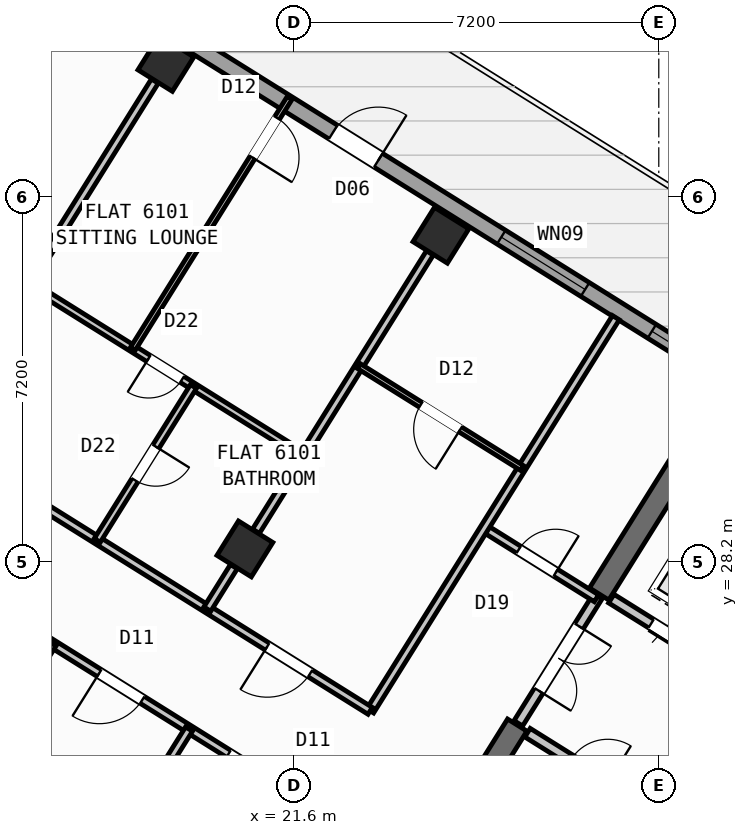
"""IFC4 building model, lengths in metres.
Left out: names, types, materials, properties, quantities, classifications, styles, units other than length and angle.
Written with IfcOpenShell. Run it as: python <this file> out.ifc"""

import sys

from ifc_helpers import new_model, si_unit, direction, frame, frame_2d, origin, origin_2d, place, context, subcontext, project, spatial, rectangle, hollow_rectangle, extrude, source, transform, mapped, element, fill, save


model = new_model("IFC4")
c1 = context("Model", 3, precision=1e-05, world=origin(), true_north=direction((0.0, 1.0)))
c2 = subcontext(c1, "Body", "Model", "MODEL_VIEW")
j1 = project(units=[si_unit("LENGTHUNIT", "METRE"), si_unit("PLANEANGLEUNIT", "RADIAN")], contexts=[c1])
p1 = place(None, origin())
s1 = spatial("IfcSite", under=j1, at=p1, CompositionType="ELEMENT")
p2 = place(p1, origin())
s2 = spatial("IfcBuilding", under=s1, at=p2, CompositionType="ELEMENT")
p3 = place(p2, frame((0.0, 0.0, 242.1)))
s3 = spatial("IfcBuildingStorey", under=s2, at=p3, CompositionType="ELEMENT", Elevation=242.1)
p4 = place(p3, frame((29.544, 30.636, 0.0), z_axis=(0.0, 0.0, 1.0), x_axis=(-0.529902075036, -0.848058836916, 0.0)))
e1 = element("IfcWall", 1, at=p4, inside=s3, PredefinedType="SHEAR", context=c2, shape_type="SweptSolid", body=[
    extrude(rectangle(XDim=3.625, YDim=0.45, at=frame_2d((1.812, 0.0))), origin(), (0.0, 0.0, 1.0), 3.32),
])
p5 = place(p3, frame((26.007, 24.976, 0.0), z_axis=(0.0, 0.0, 1.0), x_axis=(-0.529931155655, -0.848040665456, 0.0)))
e2 = element("IfcWall", 2, at=p5, inside=s3, PredefinedType="SHEAR", context=c2, shape_type="SweptSolid", body=[
    extrude(rectangle(XDim=6.475, YDim=0.45, at=frame_2d((3.238, 0.0))), origin(), (0.0, 0.0, 1.0), 3.32),
])
m1 = source(origin(), c2, "Body", "SweptSolid", [
    extrude(hollow_rectangle(XDim=0.8, YDim=0.8, WallThickness=0.032, at=origin_2d()), origin(), (0.0, 0.0, 1.0), 3.6),
])
for number, where, z_axis, x_axis in (
    (3, (24.5, 34.643, 0.0), (0.0, 0.0, 1.0), (-0.848, 0.53, 0.0)),
    (4, (20.632, 28.452, 0.0), (0.0, 0.0, 1.0), (-0.848, 0.53, 0.0)),
    (5, (19.073, 38.034, 0.0), (0.0, 0.0, 1.0), (-0.848, 0.53, 0.0)),
):
    element("IfcColumn", number, at=place(p3, frame(where, z_axis=z_axis, x_axis=x_axis)), inside=s3, PredefinedType="COLUMN", context=c2, shape_type="MappedRepresentation", body=[
        mapped(m1, transform((0.0, 0.0, 0.0), scale=1.0)),
    ])
p6 = place(p3, frame((14.138, 41.825, 0.0), z_axis=(0.0, 0.0, 1.0), x_axis=(0.848046498049, -0.529921821731, 0.0)))
e6 = element("IfcWall", 6, at=p6, inside=s3, PredefinedType="STANDARD", context=c2, shape_type="SweptSolid", body=[
    extrude(rectangle(XDim=31.588, YDim=0.32, at=frame_2d((15.794, 0.0))), origin(), (0.0, 0.0, 1.0), 3.32),
])
p7 = place(p6, frame((9.712, 0.0, 0.0)))
e7 = element("IfcOpeningElement", 7, at=p7, cuts=e6, PredefinedType="OPENING", context=c2, shape_type="SweptSolid", body=[
    extrude(rectangle(XDim=1.05, YDim=2.15, at=frame_2d((0.525, 1.075))), frame((0.0, 0.17, 0.0), z_axis=(0.0, -1.0, 0.0), x_axis=(1.0, 0.0, 0.0)), (0.0, 0.0, 1.0), 0.34),
])
p8 = place(p6, frame((0.841, 0.0, 0.9)))
e8 = element("IfcOpeningElement", 8, at=p8, cuts=e6, PredefinedType="OPENING", context=c2, shape_type="SweptSolid", body=[
    extrude(rectangle(XDim=1.65, YDim=1.45, at=frame_2d((0.825, 0.725))), frame((0.0, 0.17, 0.0), z_axis=(0.0, -1.0, 0.0), x_axis=(1.0, 0.0, 0.0)), (0.0, 0.0, 1.0), 0.34),
])
p9 = place(p6, frame((4.171, 0.0, 1.0)))
e9 = element("IfcOpeningElement", 9, at=p9, cuts=e6, PredefinedType="OPENING", context=c2, shape_type="SweptSolid", body=[
    extrude(rectangle(XDim=0.9, YDim=1.25, at=frame_2d((0.45, 0.625))), frame((0.0, 0.17, 0.0), z_axis=(0.0, -1.0, 0.0), x_axis=(1.0, 0.0, 0.0)), (0.0, 0.0, 1.0), 0.34),
])
p10 = place(p6, frame((13.624, 0.0, 0.95)))
e10 = element("IfcOpeningElement", 10, at=p10, cuts=e6, PredefinedType="OPENING", context=c2, shape_type="SweptSolid", body=[
    extrude(rectangle(XDim=1.95, YDim=1.35, at=frame_2d((0.975, 0.675))), frame((0.0, 0.17, 0.0), z_axis=(0.0, -1.0, 0.0), x_axis=(1.0, 0.0, 0.0)), (0.0, 0.0, 1.0), 0.34),
])
p11 = place(p6, frame((17.129, 0.0, 1.0)))
e11 = element("IfcOpeningElement", 11, at=p11, cuts=e6, PredefinedType="OPENING", context=c2, shape_type="SweptSolid", body=[
    extrude(rectangle(XDim=0.9, YDim=1.25, at=frame_2d((0.45, 0.625))), frame((0.0, 0.17, 0.0), z_axis=(0.0, -1.0, 0.0), x_axis=(1.0, 0.0, 0.0)), (0.0, 0.0, 1.0), 0.34),
])
p12 = place(p6, frame((21.744, 0.0, 0.9)))
e12 = element("IfcOpeningElement", 12, at=p12, cuts=e6, PredefinedType="OPENING", context=c2, shape_type="SweptSolid", body=[
    extrude(rectangle(XDim=1.65, YDim=1.45, at=frame_2d((0.825, 0.725))), frame((0.0, 0.17, 0.0), z_axis=(0.0, -1.0, 0.0), x_axis=(1.0, 0.0, 0.0)), (0.0, 0.0, 1.0), 0.34),
])
p13 = place(p6, frame((27.394, 0.0, 0.9)))
e13 = element("IfcOpeningElement", 13, at=p13, cuts=e6, PredefinedType="OPENING", context=c2, shape_type="SweptSolid", body=[
    extrude(rectangle(XDim=1.65, YDim=1.45, at=frame_2d((0.825, 0.725))), frame((0.0, 0.17, 0.0), z_axis=(0.0, -1.0, 0.0), x_axis=(1.0, 0.0, 0.0)), (0.0, 0.0, 1.0), 0.34),
])
p14 = place(p3, frame((31.822, 24.998, 0.0), z_axis=(0.0, 0.0, 1.0), x_axis=(-0.848054125777, 0.529909614701, 0.0)))
e14 = element("IfcWall", 14, at=p14, inside=s3, PredefinedType="STANDARD", context=c2, shape_type="SweptSolid", body=[
    extrude(rectangle(XDim=4.668, YDim=0.2, at=frame_2d((2.334, 0.0))), origin(), (0.0, 0.0, 1.0), 3.31),
])
p15 = place(p14, frame((0.52, 0.0, 0.0)))
e15 = element("IfcOpeningElement", 15, at=p15, cuts=e14, PredefinedType="OPENING", context=c2, shape_type="SweptSolid", body=[
    extrude(rectangle(XDim=1.2, YDim=2.15, at=frame_2d((0.6, 1.075))), frame((0.0, 0.11, 0.0), z_axis=(0.0, -1.0, 0.0), x_axis=(1.0, 0.0, 0.0)), (0.0, 0.0, 1.0), 0.22),
])
p16 = place(p14, frame((2.54, 0.0, 0.0)))
e16 = element("IfcOpeningElement", 16, at=p16, cuts=e14, PredefinedType="OPENING", context=c2, shape_type="SweptSolid", body=[
    extrude(rectangle(XDim=1.2, YDim=2.15, at=frame_2d((0.6, 1.075))), frame((0.0, 0.11, 0.0), z_axis=(0.0, -1.0, 0.0), x_axis=(1.0, 0.0, 0.0)), (0.0, 0.0, 1.0), 0.22),
])
p17 = place(p3, frame((31.525, 21.504, 0.0), z_axis=(0.0, 0.0, 1.0), x_axis=(-0.848042066329, 0.529928913853, 0.0)))
e17 = element("IfcWall", 17, at=p17, inside=s3, PredefinedType="STANDARD", context=c2, shape_type="SweptSolid", body=[
    extrude(rectangle(XDim=6.268, YDim=0.2, at=frame_2d((3.134, 0.0))), origin(), (0.0, 0.0, 1.0), 3.31),
])
p18 = place(p17, frame((4.4, 0.0, 0.0)))
e18 = element("IfcOpeningElement", 18, at=p18, cuts=e17, PredefinedType="OPENING", context=c2, shape_type="SweptSolid", body=[
    extrude(rectangle(XDim=0.86, YDim=2.05, at=frame_2d((0.43, 1.025))), frame((0.0, 0.11, 0.0), z_axis=(0.0, -1.0, 0.0), x_axis=(1.0, 0.0, 0.0)), (0.0, 0.0, 1.0), 0.22),
])
p19 = place(p17, frame((0.35, 0.0, 0.0)))
e19 = element("IfcOpeningElement", 19, at=p19, cuts=e17, PredefinedType="OPENING", context=c2, shape_type="SweptSolid", body=[
    extrude(rectangle(XDim=0.86, YDim=2.05, at=frame_2d((0.43, 1.025))), frame((0.0, 0.11, 0.0), z_axis=(0.0, -1.0, 0.0), x_axis=(1.0, 0.0, 0.0)), (0.0, 0.0, 1.0), 0.22),
])
p20 = place(p3, frame((27.596, 27.52, 0.0), z_axis=(0.0, 0.0, 1.0), x_axis=(-0.529865479138, -0.848081702443, 0.0)))
e20 = element("IfcWall", 20, at=p20, inside=s3, PredefinedType="STANDARD", context=c2, shape_type="SweptSolid", body=[
    extrude(rectangle(XDim=2.96, YDim=0.2, at=frame_2d((1.48, 0.0))), origin(), (0.0, 0.0, 1.0), 3.31),
])
p21 = place(p20, frame((0.7, 0.0, 0.0)))
e21 = element("IfcOpeningElement", 21, at=p21, cuts=e20, PredefinedType="OPENING", context=c2, shape_type="SweptSolid", body=[
    extrude(rectangle(XDim=1.5, YDim=2.15, at=frame_2d((0.75, 1.075))), frame((0.0, 0.11, 0.0), z_axis=(0.0, -1.0, 0.0), x_axis=(1.0, 0.0, 0.0)), (0.0, 0.0, 1.0), 0.22),
])
p22 = place(p3, frame((27.57, 27.478, 0.0), z_axis=(0.0, 0.0, 1.0), x_axis=(-0.848050851465, 0.529914854792, 0.0)))
e22 = element("IfcWall", 22, at=p22, inside=s3, PredefinedType="PARTITIONING", context=c2, shape_type="SweptSolid", body=[
    extrude(rectangle(XDim=2.61, YDim=0.16, at=frame_2d((1.305, 0.0))), origin(), (0.0, 0.0, 1.0), 3.31),
])
p23 = place(p22, frame((0.95, 0.0, 0.0)))
e23 = element("IfcOpeningElement", 23, at=p23, cuts=e22, PredefinedType="OPENING", context=c2, shape_type="SweptSolid", body=[
    extrude(rectangle(XDim=0.86, YDim=2.05, at=frame_2d((0.43, 1.025))), frame((0.0, 0.09, 0.0), z_axis=(0.0, -1.0, 0.0), x_axis=(1.0, 0.0, 0.0)), (0.0, 0.0, 1.0), 0.18),
])
p24 = place(p3, frame((27.953, 33.016, 0.0), z_axis=(0.0, 0.0, 1.0), x_axis=(-0.529903001606, -0.848058257957, 0.0)))
e24 = element("IfcWall", 24, at=p24, inside=s3, PredefinedType="PARTITIONING", context=c2, shape_type="SweptSolid", body=[
    extrude(rectangle(XDim=9.15, YDim=0.16, at=frame_2d((4.575, 0.0))), origin(), (0.0, 0.0, 1.0), 3.31),
])
p25 = place(p3, frame((23.104, 25.256, 0.0), z_axis=(0.0, 0.0, 1.0), x_axis=(-0.848041752158, 0.529929416617, 0.0)))
e25 = element("IfcWall", 25, at=p25, inside=s3, PredefinedType="PARTITIONING", context=c2, shape_type="SweptSolid", body=[
    extrude(rectangle(XDim=16.73, YDim=0.16, at=frame_2d((8.365, 0.0))), origin(), (0.0, 0.0, 1.0), 3.31),
])
p26 = place(p25, frame((1.395, 0.0, 0.0)))
e26 = element("IfcOpeningElement", 26, at=p26, cuts=e25, PredefinedType="OPENING", context=c2, shape_type="SweptSolid", body=[
    extrude(rectangle(XDim=1.0, YDim=2.1, at=frame_2d((0.5, 1.05))), frame((0.0, 0.09, 0.0), z_axis=(0.0, -1.0, 0.0), x_axis=(1.0, 0.0, 0.0)), (0.0, 0.0, 1.0), 0.18),
])
p27 = place(p25, frame((7.82, 0.0, 0.0)))
e27 = element("IfcOpeningElement", 27, at=p27, cuts=e25, PredefinedType="OPENING", context=c2, shape_type="SweptSolid", body=[
    extrude(rectangle(XDim=1.0, YDim=2.1, at=frame_2d((0.5, 1.05))), frame((0.0, 0.09, 0.0), z_axis=(0.0, -1.0, 0.0), x_axis=(1.0, 0.0, 0.0)), (0.0, 0.0, 1.0), 0.18),
])
p28 = place(p25, frame((11.14, 0.0, 0.0)))
e28 = element("IfcOpeningElement", 28, at=p28, cuts=e25, PredefinedType="OPENING", context=c2, shape_type="SweptSolid", body=[
    extrude(rectangle(XDim=1.0, YDim=2.1, at=frame_2d((0.5, 1.05))), frame((0.0, 0.09, 0.0), z_axis=(0.0, -1.0, 0.0), x_axis=(1.0, 0.0, 0.0)), (0.0, 0.0, 1.0), 0.18),
])
p29 = place(p3, frame((21.938, 23.391, 0.0), z_axis=(0.0, 0.0, 1.0), x_axis=(-0.848045850158, 0.529922858565, 0.0)))
e29 = element("IfcWall", 29, at=p29, inside=s3, PredefinedType="PARTITIONING", context=c2, shape_type="SweptSolid", body=[
    extrude(rectangle(XDim=16.73, YDim=0.16, at=frame_2d((8.365, 0.0))), origin(), (0.0, 0.0, 1.0), 3.31),
])
p30 = place(p29, frame((0.92, 0.0, 0.0)))
e30 = element("IfcOpeningElement", 30, at=p30, cuts=e29, PredefinedType="OPENING", context=c2, shape_type="SweptSolid", body=[
    extrude(rectangle(XDim=1.0, YDim=2.1, at=frame_2d((0.5, 1.05))), frame((0.0, 0.09, 0.0), z_axis=(0.0, -1.0, 0.0), x_axis=(1.0, 0.0, 0.0)), (0.0, 0.0, 1.0), 0.18),
])
p31 = place(p29, frame((3.928, 0.0, 0.0)))
e31 = element("IfcOpeningElement", 31, at=p31, cuts=e29, PredefinedType="OPENING", context=c2, shape_type="SweptSolid", body=[
    extrude(rectangle(XDim=1.0, YDim=2.1, at=frame_2d((0.5, 1.05))), frame((0.0, 0.09, 0.0), z_axis=(0.0, -1.0, 0.0), x_axis=(1.0, 0.0, 0.0)), (0.0, 0.0, 1.0), 0.18),
])
p32 = place(p29, frame((7.271, 0.0, 0.0)))
e32 = element("IfcOpeningElement", 32, at=p32, cuts=e29, PredefinedType="OPENING", context=c2, shape_type="SweptSolid", body=[
    extrude(rectangle(XDim=1.0, YDim=2.1, at=frame_2d((0.5, 1.05))), frame((0.0, 0.09, 0.0), z_axis=(0.0, -1.0, 0.0), x_axis=(1.0, 0.0, 0.0)), (0.0, 0.0, 1.0), 0.18),
])
p33 = place(p29, frame((10.78, 0.0, 0.0)))
e33 = element("IfcOpeningElement", 33, at=p33, cuts=e29, PredefinedType="OPENING", context=c2, shape_type="SweptSolid", body=[
    extrude(rectangle(XDim=1.0, YDim=2.1, at=frame_2d((0.5, 1.05))), frame((0.0, 0.09, 0.0), z_axis=(0.0, -1.0, 0.0), x_axis=(1.0, 0.0, 0.0)), (0.0, 0.0, 1.0), 0.18),
])
p34 = place(p29, frame((14.372, 0.0, 0.0)))
e34 = element("IfcOpeningElement", 34, at=p34, cuts=e29, PredefinedType="OPENING", context=c2, shape_type="SweptSolid", body=[
    extrude(rectangle(XDim=1.0, YDim=2.1, at=frame_2d((0.5, 1.05))), frame((0.0, 0.09, 0.0), z_axis=(0.0, -1.0, 0.0), x_axis=(1.0, 0.0, 0.0)), (0.0, 0.0, 1.0), 0.18),
])
p35 = place(p3, frame((19.529, 24.896, 0.0), z_axis=(0.0, 0.0, 1.0), x_axis=(-0.529914125013, -0.848051307476, 0.0)))
e35 = element("IfcWall", 35, at=p35, inside=s3, PredefinedType="PARTITIONING", context=c2, shape_type="SweptSolid", body=[
    extrude(rectangle(XDim=10.35, YDim=0.16, at=frame_2d((5.175, 0.0))), origin(), (0.0, 0.0, 1.0), 3.31),
])
p36 = place(p3, frame((16.837, 26.579, 0.0), z_axis=(0.0, 0.0, 1.0), x_axis=(-0.529941690036, -0.848034082547, 0.0)))
e36 = element("IfcWall", 36, at=p36, inside=s3, PredefinedType="PARTITIONING", context=c2, shape_type="SweptSolid", body=[
    extrude(rectangle(XDim=10.35, YDim=0.16, at=frame_2d((5.175, 0.0))), origin(), (0.0, 0.0, 1.0), 2.935),
])
p37 = place(p3, frame((24.282, 34.293, 0.0), z_axis=(0.0, 0.0, 1.0), x_axis=(-0.529934553702, -0.848038542045, 0.0)))
e37 = element("IfcWall", 37, at=p37, inside=s3, PredefinedType="PARTITIONING", context=c2, shape_type="SweptSolid", body=[
    extrude(rectangle(XDim=6.476, YDim=0.16, at=frame_2d((3.238, 0.0))), origin(), (0.0, 0.0, 1.0), 2.845),
])
p38 = place(p3, frame((20.414, 28.103, 0.0), z_axis=(0.0, 0.0, 1.0), x_axis=(-0.529998940003, -0.847998304005, 0.0)))
e38 = element("IfcWall", 38, at=p38, inside=s3, PredefinedType="PARTITIONING", context=c2, shape_type="SweptSolid", body=[
    extrude(rectangle(XDim=0.988, YDim=0.16, at=frame_2d((0.494, 0.0))), origin(), (0.0, 0.0, 1.0), 2.845),
])
p39 = place(p3, frame((26.099, 30.05, 0.0), z_axis=(0.0, 0.0, 1.0), x_axis=(-0.84803087207, 0.529946827537, 0.0)))
e39 = element("IfcWall", 39, at=p39, inside=s3, PredefinedType="PARTITIONING", context=c2, shape_type="SweptSolid", body=[
    extrude(rectangle(XDim=3.79, YDim=0.11, at=frame_2d((1.895, 0.0))), origin(), (0.0, 0.0, 1.0), 3.31),
])
p40 = place(p39, frame((1.435, 0.0, 0.0)))
e40 = element("IfcOpeningElement", 40, at=p40, cuts=e39, PredefinedType="OPENING", context=c2, shape_type="SweptSolid", body=[
    extrude(rectangle(XDim=0.92, YDim=2.08, at=frame_2d((0.46, 1.04))), frame((0.0, 0.065, 0.0), z_axis=(0.0, -1.0, 0.0), x_axis=(1.0, 0.0, 0.0)), (0.0, 0.0, 1.0), 0.13),
])
p41 = place(p3, frame((18.854, 37.685, 0.0), z_axis=(0.0, 0.0, 1.0), x_axis=(-0.529907440938, -0.848055484057, 0.0)))
e41 = element("IfcWall", 41, at=p41, inside=s3, PredefinedType="PARTITIONING", context=c2, shape_type="SweptSolid", body=[
    extrude(rectangle(XDim=6.476, YDim=0.16, at=frame_2d((3.238, 0.0))), origin(), (0.0, 0.0, 1.0), 2.845),
])
p42 = place(p3, frame((21.787, 30.301, 0.0), z_axis=(0.0, 0.0, 1.0), x_axis=(-0.848049732085, 0.529916646191, 0.0)))
e42 = element("IfcWall", 42, at=p42, inside=s3, PredefinedType="PLUMBINGWALL", context=c2, shape_type="SweptSolid", body=[
    extrude(rectangle(XDim=6.4, YDim=0.14, at=frame_2d((3.2, 0.0))), origin(), (0.0, 0.0, 1.0), 3.31),
])
p43 = place(p42, frame((2.824, 0.0, 0.0)))
e43 = element("IfcOpeningElement", 43, at=p43, cuts=e42, PredefinedType="OPENING", context=c2, shape_type="SweptSolid", body=[
    extrude(rectangle(XDim=0.78, YDim=2.05, at=frame_2d((0.39, 1.025))), frame((0.0, 0.08, 0.0), z_axis=(0.0, -1.0, 0.0), x_axis=(1.0, 0.0, 0.0)), (0.0, 0.0, 1.0), 0.16),
])
p44 = place(p3, frame((19.616, 31.657, 0.0), z_axis=(0.0, 0.0, 1.0), x_axis=(-0.529876336437, -0.84807491891, 0.0)))
e44 = element("IfcWall", 44, at=p44, inside=s3, PredefinedType="PLUMBINGWALL", context=c2, shape_type="SweptSolid", body=[
    extrude(rectangle(XDim=3.58, YDim=0.14, at=frame_2d((1.79, 0.0))), origin(), (0.0, 0.0, 1.0), 3.31),
])
p45 = place(p44, frame((1.4, 0.0, 0.0)))
e45 = element("IfcOpeningElement", 45, at=p45, cuts=e44, PredefinedType="OPENING", context=c2, shape_type="SweptSolid", body=[
    extrude(rectangle(XDim=0.78, YDim=2.05, at=frame_2d((0.39, 1.025))), frame((0.0, 0.08, 0.0), z_axis=(0.0, -1.0, 0.0), x_axis=(1.0, 0.0, 0.0)), (0.0, 0.0, 1.0), 0.16),
])
p46 = place(p3, frame((21.517, 37.356, 0.0), z_axis=(0.0, 0.0, 1.0), x_axis=(-0.529916267533, -0.848049968695, 0.0)))
e46 = element("IfcWall", 46, at=p46, inside=s3, PredefinedType="PARTITIONING", context=c2, shape_type="SweptSolid", body=[
    extrude(rectangle(XDim=5.84, YDim=0.11, at=frame_2d((2.92, 0.0))), origin(), (0.0, 0.0, 1.0), 3.31),
])
p47 = place(p46, frame((0.47, 0.0, 0.0)))
e47 = element("IfcOpeningElement", 47, at=p47, cuts=e46, PredefinedType="OPENING", context=c2, shape_type="SweptSolid", body=[
    extrude(rectangle(XDim=0.92, YDim=2.08, at=frame_2d((0.46, 1.04))), frame((0.0, 0.065, 0.0), z_axis=(0.0, -1.0, 0.0), x_axis=(1.0, 0.0, 0.0)), (0.0, 0.0, 1.0), 0.13),
])
p48 = place(p3, frame((16.995, 40.182, 0.0), z_axis=(0.0, 0.0, 1.0), x_axis=(-0.529931378574, -0.848040526156, 0.0)))
e48 = element("IfcWall", 48, at=p48, inside=s3, PredefinedType="PARTITIONING", context=c2, shape_type="SweptSolid", body=[
    extrude(rectangle(XDim=9.42, YDim=0.11, at=frame_2d((4.71, 0.0))), origin(), (0.0, 0.0, 1.0), 3.31),
])
p49 = place(p48, frame((7.78, 0.0, 0.0)))
e49 = element("IfcOpeningElement", 49, at=p49, cuts=e48, PredefinedType="OPENING", context=c2, shape_type="SweptSolid", body=[
    extrude(rectangle(XDim=0.78, YDim=2.05, at=frame_2d((0.39, 1.025))), frame((0.0, 0.065, 0.0), z_axis=(0.0, -1.0, 0.0), x_axis=(1.0, 0.0, 0.0)), (0.0, 0.0, 1.0), 0.13),
])
p50 = place(p48, frame((3.05, 0.0, 0.0)))
e50 = element("IfcOpeningElement", 50, at=p50, cuts=e48, PredefinedType="OPENING", context=c2, shape_type="SweptSolid", body=[
    extrude(rectangle(XDim=0.92, YDim=2.08, at=frame_2d((0.46, 1.04))), frame((0.0, 0.065, 0.0), z_axis=(0.0, -1.0, 0.0), x_axis=(1.0, 0.0, 0.0)), (0.0, 0.0, 1.0), 0.13),
])
m2 = source(origin(), c2, "Body", "SweptSolid", [
    extrude(rectangle(XDim=1.05, YDim=2.15, at=frame_2d((0.525, 1.075))), frame((0.0, 0.025, 0.0), z_axis=(0.0, -1.0, 0.0), x_axis=(1.0, 0.0, 0.0)), (0.0, 0.0, 1.0), 0.05),
])
p51 = place(p7, origin())
e51 = element("IfcDoor", 51, at=p51, inside=s3, OperationType="SINGLE_SWING_RIGHT", PredefinedType="DOOR", context=c2, shape_type="MappedRepresentation", body=[
    mapped(m2, transform((0.0, 0.0, 0.0), scale=1.0)),
])
fill(e7, e51)
m3 = source(origin(), c2, "Body", "SweptSolid", [
    extrude(rectangle(XDim=1.95, YDim=1.35, at=frame_2d((0.975, 0.675))), frame((0.0, 0.03, 0.0), z_axis=(0.0, -1.0, 0.0), x_axis=(1.0, 0.0, 0.0)), (0.0, 0.0, 1.0), 0.06),
])
p52 = place(p10, origin())
e52 = element("IfcWindow", 52, at=p52, inside=s3, PartitioningType="SINGLE_PANEL", PredefinedType="WINDOW", context=c2, shape_type="MappedRepresentation", body=[
    mapped(m3, transform((0.0, 0.0, 0.0), scale=1.0)),
])
fill(e10, e52)
m4 = source(origin(), c2, "Body", "SweptSolid", [
    extrude(rectangle(XDim=0.9, YDim=1.25, at=frame_2d((0.45, 0.625))), frame((0.0, 0.03, 0.0), z_axis=(0.0, -1.0, 0.0), x_axis=(1.0, 0.0, 0.0)), (0.0, 0.0, 1.0), 0.06),
])
p53 = place(p11, origin())
e53 = element("IfcWindow", 53, at=p53, inside=s3, PartitioningType="SINGLE_PANEL", PredefinedType="WINDOW", context=c2, shape_type="MappedRepresentation", body=[
    mapped(m4, transform((0.0, 0.0, 0.0), scale=1.0)),
])
fill(e11, e53)
m5 = source(origin(), c2, "Body", "SweptSolid", [
    extrude(rectangle(XDim=1.2, YDim=2.15, at=frame_2d((0.6, 1.075))), frame((0.0, 0.025, 0.0), z_axis=(0.0, -1.0, 0.0), x_axis=(1.0, 0.0, 0.0)), (0.0, 0.0, 1.0), 0.05),
])
p54 = place(p16, origin())
e54 = element("IfcDoor", 54, at=p54, inside=s3, OperationType="DOUBLE_DOOR_SLIDING", PredefinedType="DOOR", context=c2, shape_type="MappedRepresentation", body=[
    mapped(m5, transform((0.0, 0.0, 0.0), scale=1.0)),
])
fill(e16, e54)
m6 = source(origin(), c2, "Body", "SweptSolid", [
    extrude(rectangle(XDim=0.86, YDim=2.05, at=frame_2d((0.43, 1.025))), frame((0.0, 0.025, 0.0), z_axis=(0.0, -1.0, 0.0), x_axis=(1.0, 0.0, 0.0)), (0.0, 0.0, 1.0), 0.05),
])
p55 = place(p23, frame((0.86, 0.0, 0.0), z_axis=(0.0, 0.0, 1.0), x_axis=(-1.0, 0.0, 0.0)))
e55 = element("IfcDoor", 55, at=p55, inside=s3, OperationType="SINGLE_SWING_RIGHT", PredefinedType="DOOR", context=c2, shape_type="MappedRepresentation", body=[
    mapped(m6, transform((0.0, 0.0, 0.0), scale=1.0)),
])
fill(e23, e55)
m7 = source(origin(), c2, "Body", "SweptSolid", [
    extrude(rectangle(XDim=1.5, YDim=2.15, at=frame_2d((0.75, 1.075))), frame((0.0, 0.025, 0.0), z_axis=(0.0, -1.0, 0.0), x_axis=(1.0, 0.0, 0.0)), (0.0, 0.0, 1.0), 0.05),
])
p56 = place(p21, origin())
e56 = element("IfcDoor", 56, at=p56, inside=s3, OperationType="DOUBLE_DOOR_SINGLE_SWING", PredefinedType="DOOR", context=c2, shape_type="MappedRepresentation", body=[
    mapped(m7, transform((0.0, 0.0, 0.0), scale=1.0)),
])
fill(e21, e56)
m8 = source(origin(), c2, "Body", "SweptSolid", [
    extrude(rectangle(XDim=1.0, YDim=2.1, at=frame_2d((0.5, 1.05))), frame((0.0, 0.025, 0.0), z_axis=(0.0, -1.0, 0.0), x_axis=(1.0, 0.0, 0.0)), (0.0, 0.0, 1.0), 0.05),
])
p57 = place(p30, origin())
e57 = element("IfcDoor", 57, at=p57, inside=s3, OperationType="SINGLE_SWING_LEFT", PredefinedType="DOOR", context=c2, shape_type="MappedRepresentation", body=[
    mapped(m8, transform((0.0, 0.0, 0.0), scale=1.0)),
])
fill(e30, e57)
p58 = place(p31, origin())
e58 = element("IfcDoor", 58, at=p58, inside=s3, OperationType="SINGLE_SWING_RIGHT", PredefinedType="DOOR", context=c2, shape_type="MappedRepresentation", body=[
    mapped(m8, transform((0.0, 0.0, 0.0), scale=1.0)),
])
fill(e31, e58)
p59 = place(p26, origin())
e59 = element("IfcDoor", 59, at=p59, inside=s3, OperationType="SINGLE_SWING_RIGHT", PredefinedType="DOOR", context=c2, shape_type="MappedRepresentation", body=[
    mapped(m8, transform((0.0, 0.0, 0.0), scale=1.0)),
])
fill(e26, e59)
m9 = source(origin(), c2, "Body", "SweptSolid", [
    extrude(rectangle(XDim=0.92, YDim=2.08, at=frame_2d((0.46, 1.04))), frame((0.0, 0.025, 0.0), z_axis=(0.0, -1.0, 0.0), x_axis=(1.0, 0.0, 0.0)), (0.0, 0.0, 1.0), 0.05),
])
p60 = place(p40, origin())
e60 = element("IfcDoor", 60, at=p60, inside=s3, OperationType="SINGLE_SWING_LEFT", PredefinedType="DOOR", context=c2, shape_type="MappedRepresentation", body=[
    mapped(m9, transform((0.0, 0.0, 0.0), scale=1.0)),
])
fill(e40, e60)
p61 = place(p47, origin())
e61 = element("IfcDoor", 61, at=p61, inside=s3, OperationType="SINGLE_SWING_RIGHT", PredefinedType="DOOR", context=c2, shape_type="MappedRepresentation", body=[
    mapped(m9, transform((0.0, 0.0, 0.0), scale=1.0)),
])
fill(e47, e61)
m10 = source(origin(), c2, "Body", "SweptSolid", [
    extrude(rectangle(XDim=0.78, YDim=2.05, at=frame_2d((0.39, 1.025))), frame((0.0, 0.025, 0.0), z_axis=(0.0, -1.0, 0.0), x_axis=(1.0, 0.0, 0.0)), (0.0, 0.0, 1.0), 0.05),
])
p62 = place(p43, origin())
e62 = element("IfcDoor", 62, at=p62, inside=s3, OperationType="SINGLE_SWING_RIGHT", PredefinedType="DOOR", context=c2, shape_type="MappedRepresentation", body=[
    mapped(m10, transform((0.0, 0.0, 0.0), scale=1.0)),
])
fill(e43, e62)
p63 = place(p45, origin())
e63 = element("IfcDoor", 63, at=p63, inside=s3, OperationType="SINGLE_SWING_LEFT", PredefinedType="DOOR", context=c2, shape_type="MappedRepresentation", body=[
    mapped(m10, transform((0.0, 0.0, 0.0), scale=1.0)),
])
fill(e45, e63)
save(model, sys.argv[1])
